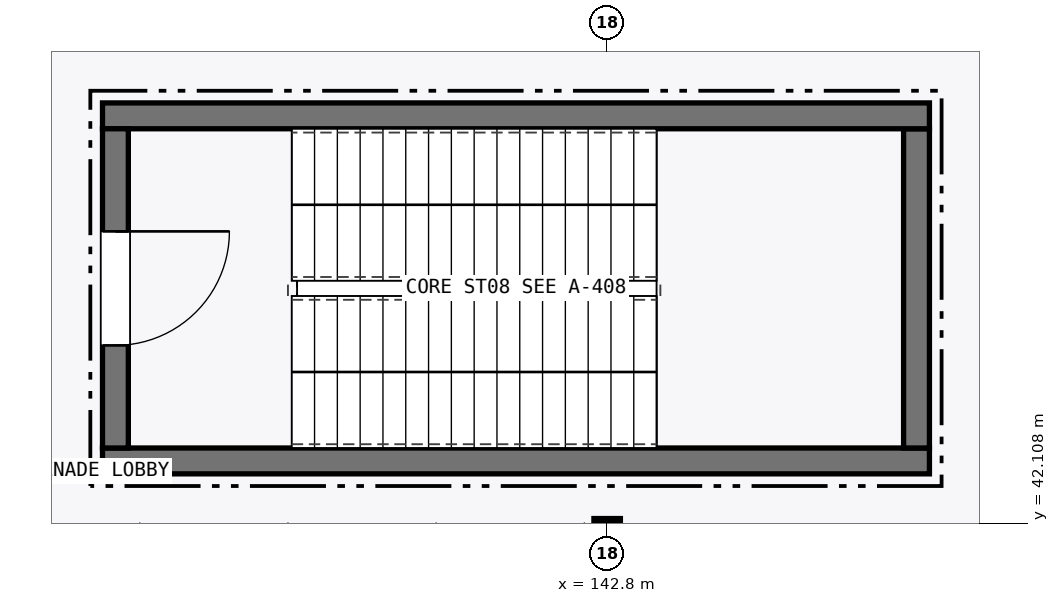
"""IFC4 building model, lengths in metres.
Left out: names, types, materials, properties, quantities, classifications, styles, units other than length and angle.
Written with IfcOpenShell. Run it as: python <this file> out.ifc"""

import sys

from ifc_helpers import new_model, si_unit, direction, frame, frame_2d, origin, origin_2d, place, context, subcontext, project, spatial, rectangle, i_section, extrude, element, fill, save


model = new_model("IFC4")
c1 = context("Model", 3, precision=1e-05, world=origin(), true_north=direction((0.0, 1.0)))
c2 = subcontext(c1, "Body", "Model", "MODEL_VIEW")
j1 = project(units=[si_unit("LENGTHUNIT", "METRE"), si_unit("PLANEANGLEUNIT", "RADIAN")], contexts=[c1])
p1 = place(None, origin())
s1 = spatial("IfcSite", under=j1, at=p1, CompositionType="ELEMENT")
p2 = place(p1, origin())
s2 = spatial("IfcBuilding", under=s1, at=p2, CompositionType="ELEMENT")
p3 = place(p2, frame((0.0, 0.0, 21.6)))
s3 = spatial("IfcBuildingStorey", under=s2, at=p3, CompositionType="ELEMENT", Elevation=21.6)
p4 = place(p3, frame((142.8, 42.0, 0.0), z_axis=(0.0, 0.0, 1.0), x_axis=(1.0, 0.0, 0.0)))
e1 = element("IfcColumn", 1, at=p4, inside=s3, PredefinedType="COLUMN", context=c2, shape_type="SweptSolid", body=[
    extrude(i_section(OverallWidth=0.348, OverallDepth=0.344, WebThickness=0.01, FlangeThickness=0.016, FilletRadius=0.02, at=origin_2d()), origin(), (0.0, 0.0, 1.0), 5.1),
])
p5 = place(p3, frame((142.8, 42.0, 5.1), z_axis=(0.0, 0.0, 1.0), x_axis=(1.0, 0.0, 0.0)))
e2 = element("IfcColumn", 2, at=p5, inside=s3, PredefinedType="COLUMN", context=c2, shape_type="SweptSolid", body=[
    extrude(i_section(OverallWidth=0.25, OverallDepth=0.25, WebThickness=0.009, FlangeThickness=0.014, FilletRadius=0.016, at=origin_2d()), origin(), (0.0, 0.0, 1.0), 4.2),
])
p6 = place(p3, frame((136.16, 42.93, 0.0), z_axis=(0.0, 0.0, 1.0), x_axis=(1.0, 0.0, 0.0)))
e3 = element("IfcWall", 3, at=p6, inside=s3, PredefinedType="SHEAR", context=c2, shape_type="SweptSolid", body=[
    extrude(rectangle(XDim=10.88, YDim=0.34, at=frame_2d((5.44, 0.0))), origin(), (0.0, 0.0, 1.0), 4.845),
])
p7 = place(p3, frame((146.87, 43.1, 0.0), z_axis=(0.0, 0.0, 1.0), x_axis=(0.0, 1.0, 0.0)))
e4 = element("IfcWall", 4, at=p7, inside=s3, PredefinedType="SHEAR", context=c2, shape_type="SweptSolid", body=[
    extrude(rectangle(XDim=4.2, YDim=0.34, at=frame_2d((2.1, 0.0))), origin(), (0.0, 0.0, 1.0), 4.845),
])
p8 = place(p3, frame((147.04, 47.47, 0.0), z_axis=(0.0, 0.0, 1.0), x_axis=(-1.0, 0.0, 0.0)))
e5 = element("IfcWall", 5, at=p8, inside=s3, PredefinedType="SHEAR", context=c2, shape_type="SweptSolid", body=[
    extrude(rectangle(XDim=10.88, YDim=0.34, at=frame_2d((5.44, 0.0))), origin(), (0.0, 0.0, 1.0), 4.845),
])
p9 = place(p3, frame((136.33, 47.3, 0.0), z_axis=(0.0, 0.0, 1.0), x_axis=(0.0, -1.0, 0.0)))
e6 = element("IfcWall", 6, at=p9, inside=s3, PredefinedType="SHEAR", context=c2, shape_type="SweptSolid", body=[
    extrude(rectangle(XDim=4.2, YDim=0.34, at=frame_2d((2.1, 0.0))), origin(), (0.0, 0.0, 1.0), 4.845),
])
p10 = place(p9, frame((1.35, 0.0, 0.0)))
e7 = element("IfcOpeningElement", 7, at=p10, cuts=e6, PredefinedType="OPENING", context=c2, shape_type="SweptSolid", body=[
    extrude(rectangle(XDim=1.5, YDim=2.15, at=frame_2d((0.75, 1.075))), frame((0.0, 0.18, 0.0), z_axis=(0.0, -1.0, 0.0), x_axis=(1.0, 0.0, 0.0)), (0.0, 0.0, 1.0), 0.36),
])
p11 = place(p10, origin())
e8 = element("IfcDoor", 8, at=p11, inside=s3, OperationType="SINGLE_SWING_LEFT", PredefinedType="DOOR", context=c2, shape_type="SweptSolid", body=[
    extrude(rectangle(XDim=1.5, YDim=2.15, at=frame_2d((0.75, 1.075))), frame((0.0, 0.025, 0.0), z_axis=(0.0, -1.0, 0.0), x_axis=(1.0, 0.0, 0.0)), (0.0, 0.0, 1.0), 0.05),
])
fill(e7, e8)
save(model, sys.argv[1])
